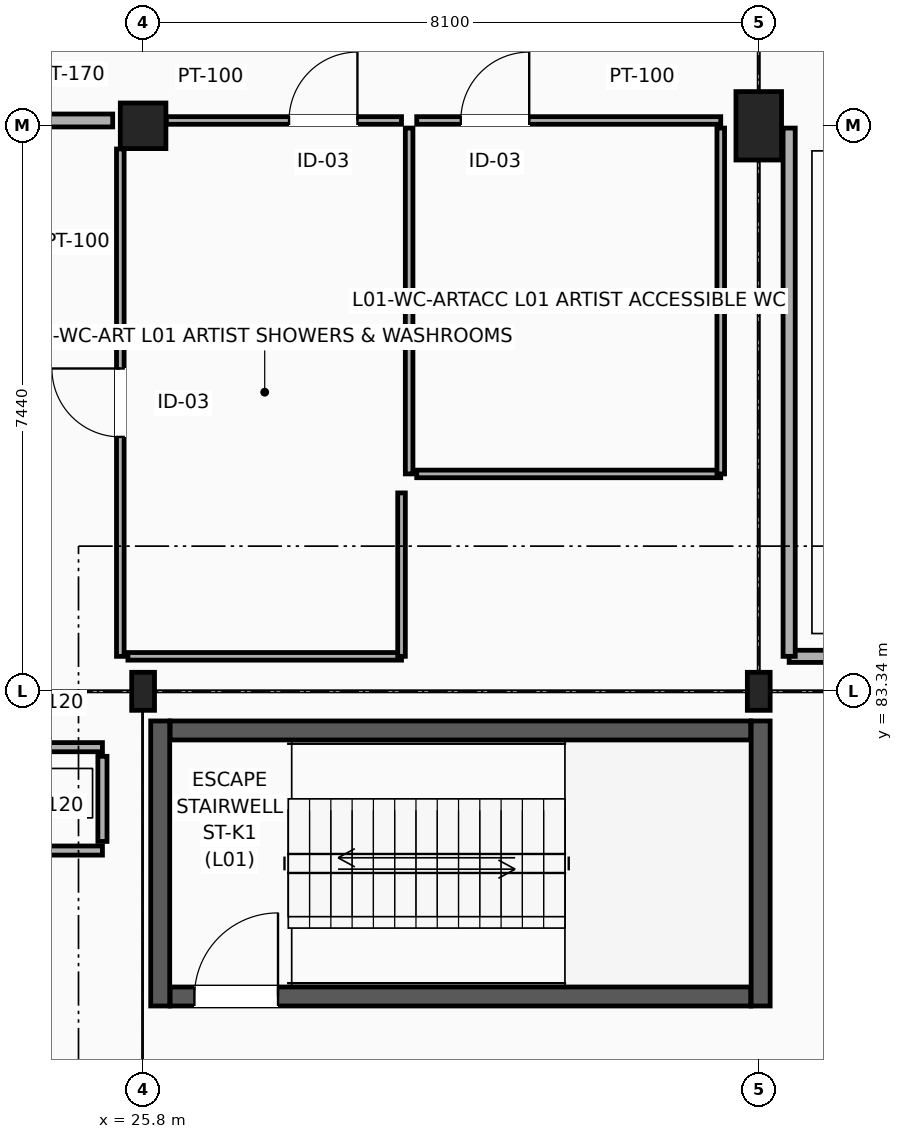
"""IFC4 building model, lengths in metres.
Left out: names, types, materials, properties, quantities, classifications, styles, units other than length and angle.
Written with IfcOpenShell. Run it as: python <this file> out.ifc"""

import sys

from ifc_helpers import new_model, si_unit, direction, frame, frame_2d, origin, origin_2d, place, context, subcontext, project, spatial, rectangle, i_section, extrude, element, fill, save


model = new_model("IFC4")
c1 = context("Model", 3, precision=1e-05, world=origin(), true_north=direction((0.0, 1.0)))
c2 = subcontext(c1, "Body", "Model", "MODEL_VIEW")
j1 = project(units=[si_unit("LENGTHUNIT", "METRE"), si_unit("PLANEANGLEUNIT", "RADIAN")], contexts=[c1])
p1 = place(None, origin())
s1 = spatial("IfcSite", under=j1, at=p1, CompositionType="ELEMENT")
p2 = place(p1, origin())
s2 = spatial("IfcBuilding", under=s1, at=p2, CompositionType="ELEMENT")
p3 = place(p2, frame((0.0, 0.0, 5.4)))
s3 = spatial("IfcBuildingStorey", under=s2, at=p3, CompositionType="ELEMENT", Elevation=5.4)
p4 = place(p3, frame((25.8, 83.34, 0.0), z_axis=(0.0, 0.0, 1.0), x_axis=(1.0, 0.0, 0.0)))
e1 = element("IfcColumn", 1, at=p4, inside=s3, PredefinedType="COLUMN", context=c2, shape_type="SweptSolid", body=[
    extrude(i_section(OverallWidth=0.3, OverallDepth=0.5, WebThickness=0.014, FlangeThickness=0.028, FilletRadius=0.027, at=origin_2d()), origin(), (0.0, 0.0, 1.0), 4.8),
])
p5 = place(p3, frame((25.8, 90.78, 0.0), z_axis=(0.0, 0.0, 1.0), x_axis=(1.0, 0.0, 0.0)))
e2 = element("IfcColumn", 2, at=p5, inside=s3, PredefinedType="COLUMN", context=c2, shape_type="SweptSolid", body=[
    extrude(rectangle(XDim=0.6, YDim=0.6, at=origin_2d()), origin(), (0.0, 0.0, 1.0), 4.8),
])
p6 = place(p3, frame((33.9, 83.34, 0.0), z_axis=(0.0, 0.0, 1.0), x_axis=(1.0, 0.0, 0.0)))
e3 = element("IfcColumn", 3, at=p6, inside=s3, PredefinedType="COLUMN", context=c2, shape_type="SweptSolid", body=[
    extrude(i_section(OverallWidth=0.3, OverallDepth=0.5, WebThickness=0.014, FlangeThickness=0.028, FilletRadius=0.027, at=origin_2d()), origin(), (0.0, 0.0, 1.0), 4.8),
])
p7 = place(p3, frame((33.9, 90.78, 0.0), z_axis=(0.0, 0.0, 1.0), x_axis=(1.0, 0.0, 0.0)))
e4 = element("IfcColumn", 4, at=p7, inside=s3, PredefinedType="COLUMN", context=c2, shape_type="SweptSolid", body=[
    extrude(rectangle(XDim=0.6, YDim=0.9, at=origin_2d()), origin(), (0.0, 0.0, 1.0), 4.8),
])
p8 = place(p3, frame((26.155, 79.325, 0.0), z_axis=(0.0, 0.0, 1.0), x_axis=(1.0, 0.0, 0.0)))
e5 = element("IfcWall", 5, at=p8, inside=s3, PredefinedType="SHEAR", context=c2, shape_type="SweptSolid", body=[
    extrude(rectangle(XDim=7.64, YDim=0.25, at=frame_2d((3.82, 0.0))), origin(), (0.0, 0.0, 1.0), 4.525),
])
p9 = place(p8, frame((0.32, 0.0, 0.0)))
e6 = element("IfcOpeningElement", 6, at=p9, cuts=e5, PredefinedType="OPENING", context=c2, shape_type="SweptSolid", body=[
    extrude(rectangle(XDim=1.1, YDim=2.2, at=frame_2d((0.55, 1.1))), frame((0.0, 0.135, 0.0), z_axis=(0.0, -1.0, 0.0), x_axis=(1.0, 0.0, 0.0)), (0.0, 0.0, 1.0), 0.27),
])
p10 = place(p3, frame((26.155, 82.825, 0.0), z_axis=(0.0, 0.0, 1.0), x_axis=(1.0, 0.0, 0.0)))
e7 = element("IfcWall", 7, at=p10, inside=s3, PredefinedType="SHEAR", context=c2, shape_type="SweptSolid", body=[
    extrude(rectangle(XDim=7.64, YDim=0.25, at=frame_2d((3.82, 0.0))), origin(), (0.0, 0.0, 1.0), 4.525),
])
for number, where, z_axis, x_axis in (
    (8, (26.025, 79.2, 0.0), (0.0, 0.0, 1.0), (0.0, 1.0, 0.0)),
    (9, (33.925, 79.2, 0.0), (0.0, 0.0, 1.0), (0.0, 1.0, 0.0)),
):
    element("IfcWall", number, at=place(p3, frame(where, z_axis=z_axis, x_axis=x_axis)), inside=s3, PredefinedType="SHEAR", context=c2, shape_type="SweptSolid", body=[
        extrude(rectangle(XDim=3.75, YDim=0.25, at=frame_2d((1.875, 0.0))), origin(), (0.0, 0.0, 1.0), 4.525),
    ])
for number, where, z_axis, x_axis in (
    (10, (23.905, 81.245, 0.0), (0.0, 0.0, 1.0), (1.0, 0.0, 0.0)),
    (11, (23.905, 82.605, 0.0), (0.0, 0.0, 1.0), (1.0, 0.0, 0.0)),
):
    element("IfcWall", number, at=place(p3, frame(where, z_axis=z_axis, x_axis=x_axis)), inside=s3, PredefinedType="PARTITIONING", context=c2, shape_type="SweptSolid", body=[
        extrude(rectangle(XDim=1.36, YDim=0.12, at=frame_2d((0.68, 0.0))), origin(), (0.0, 0.0, 1.0), 4.505),
    ])
p11 = place(p3, frame((25.265, 81.365, 0.0), z_axis=(0.0, 0.0, 1.0), x_axis=(0.0, 1.0, 0.0)))
e12 = element("IfcWall", 12, at=p11, inside=s3, PredefinedType="PARTITIONING", context=c2, shape_type="SweptSolid", body=[
    extrude(rectangle(XDim=1.12, YDim=0.12, at=frame_2d((0.56, 0.0))), origin(), (0.0, 0.0, 1.0), 4.505),
])
p12 = place(p3, frame((21.8, 90.85, 0.0), z_axis=(0.0, 0.0, 1.0), x_axis=(1.0, 0.0, 0.0)))
e13 = element("IfcWall", 13, at=p12, inside=s3, PredefinedType="PARTITIONING", context=c2, shape_type="SweptSolid", body=[
    extrude(rectangle(XDim=3.6, YDim=0.17, at=frame_2d((1.8, 0.0))), origin(), (0.0, 0.0, 1.0), 3.987),
])
p13 = place(p12, frame((0.58, 0.0, 0.0)))
e14 = element("IfcOpeningElement", 14, at=p13, cuts=e13, PredefinedType="OPENING", context=c2, shape_type="SweptSolid", body=[
    extrude(rectangle(XDim=1.5, YDim=2.2, at=frame_2d((0.75, 1.1))), frame((0.0, 0.095, 0.0), z_axis=(0.0, -1.0, 0.0), x_axis=(1.0, 0.0, 0.0)), (0.0, 0.0, 1.0), 0.19),
])
p14 = place(p3, frame((25.5, 83.8, 0.0), z_axis=(0.0, 0.0, 1.0), x_axis=(0.0, 1.0, 0.0)))
e15 = element("IfcWall", 15, at=p14, inside=s3, PredefinedType="PARTITIONING", context=c2, shape_type="SweptSolid", body=[
    extrude(rectangle(XDim=6.675, YDim=0.1, at=frame_2d((3.337, 0.0))), origin(), (0.0, 0.0, 1.0), 4.505),
])
p15 = place(p14, frame((2.887, 0.0, 0.0)))
e16 = element("IfcOpeningElement", 16, at=p15, cuts=e15, PredefinedType="OPENING", context=c2, shape_type="SweptSolid", body=[
    extrude(rectangle(XDim=0.9, YDim=2.1, at=frame_2d((0.45, 1.05))), frame((0.0, 0.06, 0.0), z_axis=(0.0, -1.0, 0.0), x_axis=(1.0, 0.0, 0.0)), (0.0, 0.0, 1.0), 0.12),
])
p16 = place(p3, frame((26.105, 90.85, 0.0), z_axis=(0.0, 0.0, 1.0), x_axis=(1.0, 0.0, 0.0)))
e17 = element("IfcWall", 17, at=p16, inside=s3, PredefinedType="PARTITIONING", context=c2, shape_type="SweptSolid", body=[
    extrude(rectangle(XDim=3.095, YDim=0.1, at=frame_2d((1.547, 0.0))), origin(), (0.0, 0.0, 1.0), 3.687),
])
p17 = place(p16, frame((1.615, 0.0, 0.0)))
e18 = element("IfcOpeningElement", 18, at=p17, cuts=e17, PredefinedType="OPENING", context=c2, shape_type="SweptSolid", body=[
    extrude(rectangle(XDim=0.9, YDim=2.1, at=frame_2d((0.45, 1.05))), frame((0.0, 0.06, 0.0), z_axis=(0.0, -1.0, 0.0), x_axis=(1.0, 0.0, 0.0)), (0.0, 0.0, 1.0), 0.12),
])
p18 = place(p3, frame((29.4, 90.85, 0.0), z_axis=(0.0, 0.0, 1.0), x_axis=(1.0, 0.0, 0.0)))
e19 = element("IfcWall", 19, at=p18, inside=s3, PredefinedType="PARTITIONING", context=c2, shape_type="SweptSolid", body=[
    extrude(rectangle(XDim=4.0, YDim=0.1, at=frame_2d((2.0, 0.0))), origin(), (0.0, 0.0, 1.0), 3.687),
])
p19 = place(p18, frame((0.58, 0.0, 0.0)))
e20 = element("IfcOpeningElement", 20, at=p19, cuts=e19, PredefinedType="OPENING", context=c2, shape_type="SweptSolid", body=[
    extrude(rectangle(XDim=0.9, YDim=2.1, at=frame_2d((0.45, 1.05))), frame((0.0, 0.06, 0.0), z_axis=(0.0, -1.0, 0.0), x_axis=(1.0, 0.0, 0.0)), (0.0, 0.0, 1.0), 0.12),
])
p20 = place(p3, frame((29.3, 86.2, 0.0), z_axis=(0.0, 0.0, 1.0), x_axis=(0.0, 1.0, 0.0)))
e21 = element("IfcWall", 21, at=p20, inside=s3, PredefinedType="PARTITIONING", context=c2, shape_type="SweptSolid", body=[
    extrude(rectangle(XDim=4.55, YDim=0.1, at=frame_2d((2.275, 0.0))), origin(), (0.0, 0.0, 1.0), 3.687),
])
p21 = place(p3, frame((25.6, 83.8, 0.0), z_axis=(0.0, 0.0, 1.0), x_axis=(1.0, 0.0, 0.0)))
e22 = element("IfcWall", 22, at=p21, inside=s3, PredefinedType="PARTITIONING", context=c2, shape_type="SweptSolid", body=[
    extrude(rectangle(XDim=3.6, YDim=0.1, at=frame_2d((1.8, 0.0))), origin(), (0.0, 0.0, 1.0), 3.837),
])
p22 = place(p3, frame((29.2, 83.8, 0.0), z_axis=(0.0, 0.0, 1.0), x_axis=(0.0, 1.0, 0.0)))
e23 = element("IfcWall", 23, at=p22, inside=s3, PredefinedType="PARTITIONING", context=c2, shape_type="SweptSolid", body=[
    extrude(rectangle(XDim=2.15, YDim=0.1, at=frame_2d((1.075, 0.0))), origin(), (0.0, 0.0, 1.0), 4.505),
])
p23 = place(p3, frame((29.4, 86.2, 0.0), z_axis=(0.0, 0.0, 1.0), x_axis=(1.0, 0.0, 0.0)))
e24 = element("IfcWall", 24, at=p23, inside=s3, PredefinedType="PARTITIONING", context=c2, shape_type="SweptSolid", body=[
    extrude(rectangle(XDim=4.0, YDim=0.1, at=frame_2d((2.0, 0.0))), origin(), (0.0, 0.0, 1.0), 4.187),
])
p24 = place(p3, frame((33.4, 86.2, 0.0), z_axis=(0.0, 0.0, 1.0), x_axis=(0.0, 1.0, 0.0)))
e25 = element("IfcWall", 25, at=p24, inside=s3, PredefinedType="PARTITIONING", context=c2, shape_type="SweptSolid", body=[
    extrude(rectangle(XDim=4.55, YDim=0.1, at=frame_2d((2.275, 0.0))), origin(), (0.0, 0.0, 1.0), 3.687),
])
p25 = place(p3, frame((34.3, 83.8, 0.0), z_axis=(0.0, 0.0, 1.0), x_axis=(1.0, 0.0, 0.0)))
e26 = element("IfcWall", 26, at=p25, inside=s3, PredefinedType="PARTITIONING", context=c2, shape_type="SweptSolid", body=[
    extrude(rectangle(XDim=31.5, YDim=0.16, at=frame_2d((15.75, 0.0))), origin(), (0.0, 0.0, 1.0), 3.837),
])
p26 = place(p3, frame((34.3, 83.8, 0.0), z_axis=(0.0, 0.0, 1.0), x_axis=(0.0, 1.0, 0.0)))
e27 = element("IfcWall", 27, at=p26, inside=s3, PredefinedType="PARTITIONING", context=c2, shape_type="SweptSolid", body=[
    extrude(rectangle(XDim=6.95, YDim=0.16, at=frame_2d((3.475, 0.0))), origin(), (0.0, 0.0, 1.0), 3.987),
])
p27 = place(p9, origin())
e28 = element("IfcDoor", 28, at=p27, inside=s3, OperationType="SINGLE_SWING_RIGHT", PredefinedType="DOOR", context=c2, shape_type="SweptSolid", body=[
    extrude(rectangle(XDim=1.1, YDim=2.2, at=frame_2d((0.55, 1.1))), frame((0.0, 0.025, 0.0), z_axis=(0.0, -1.0, 0.0), x_axis=(1.0, 0.0, 0.0)), (0.0, 0.0, 1.0), 0.05),
])
fill(e6, e28)
p28 = place(p15, origin())
e29 = element("IfcDoor", 29, at=p28, inside=s3, OperationType="SINGLE_SWING_RIGHT", PredefinedType="DOOR", context=c2, shape_type="SweptSolid", body=[
    extrude(rectangle(XDim=0.9, YDim=2.1, at=frame_2d((0.45, 1.05))), frame((0.0, 0.025, 0.0), z_axis=(0.0, -1.0, 0.0), x_axis=(1.0, 0.0, 0.0)), (0.0, 0.0, 1.0), 0.05),
])
fill(e16, e29)
p29 = place(p17, origin())
e30 = element("IfcDoor", 30, at=p29, inside=s3, OperationType="SINGLE_SWING_RIGHT", PredefinedType="DOOR", context=c2, shape_type="SweptSolid", body=[
    extrude(rectangle(XDim=0.9, YDim=2.1, at=frame_2d((0.45, 1.05))), frame((0.0, 0.025, 0.0), z_axis=(0.0, -1.0, 0.0), x_axis=(1.0, 0.0, 0.0)), (0.0, 0.0, 1.0), 0.05),
])
fill(e18, e30)
p30 = place(p19, origin())
e31 = element("IfcDoor", 31, at=p30, inside=s3, OperationType="SINGLE_SWING_RIGHT", PredefinedType="DOOR", context=c2, shape_type="SweptSolid", body=[
    extrude(rectangle(XDim=0.9, YDim=2.1, at=frame_2d((0.45, 1.05))), frame((0.0, 0.025, 0.0), z_axis=(0.0, -1.0, 0.0), x_axis=(1.0, 0.0, 0.0)), (0.0, 0.0, 1.0), 0.05),
])
fill(e20, e31)
save(model, sys.argv[1])
